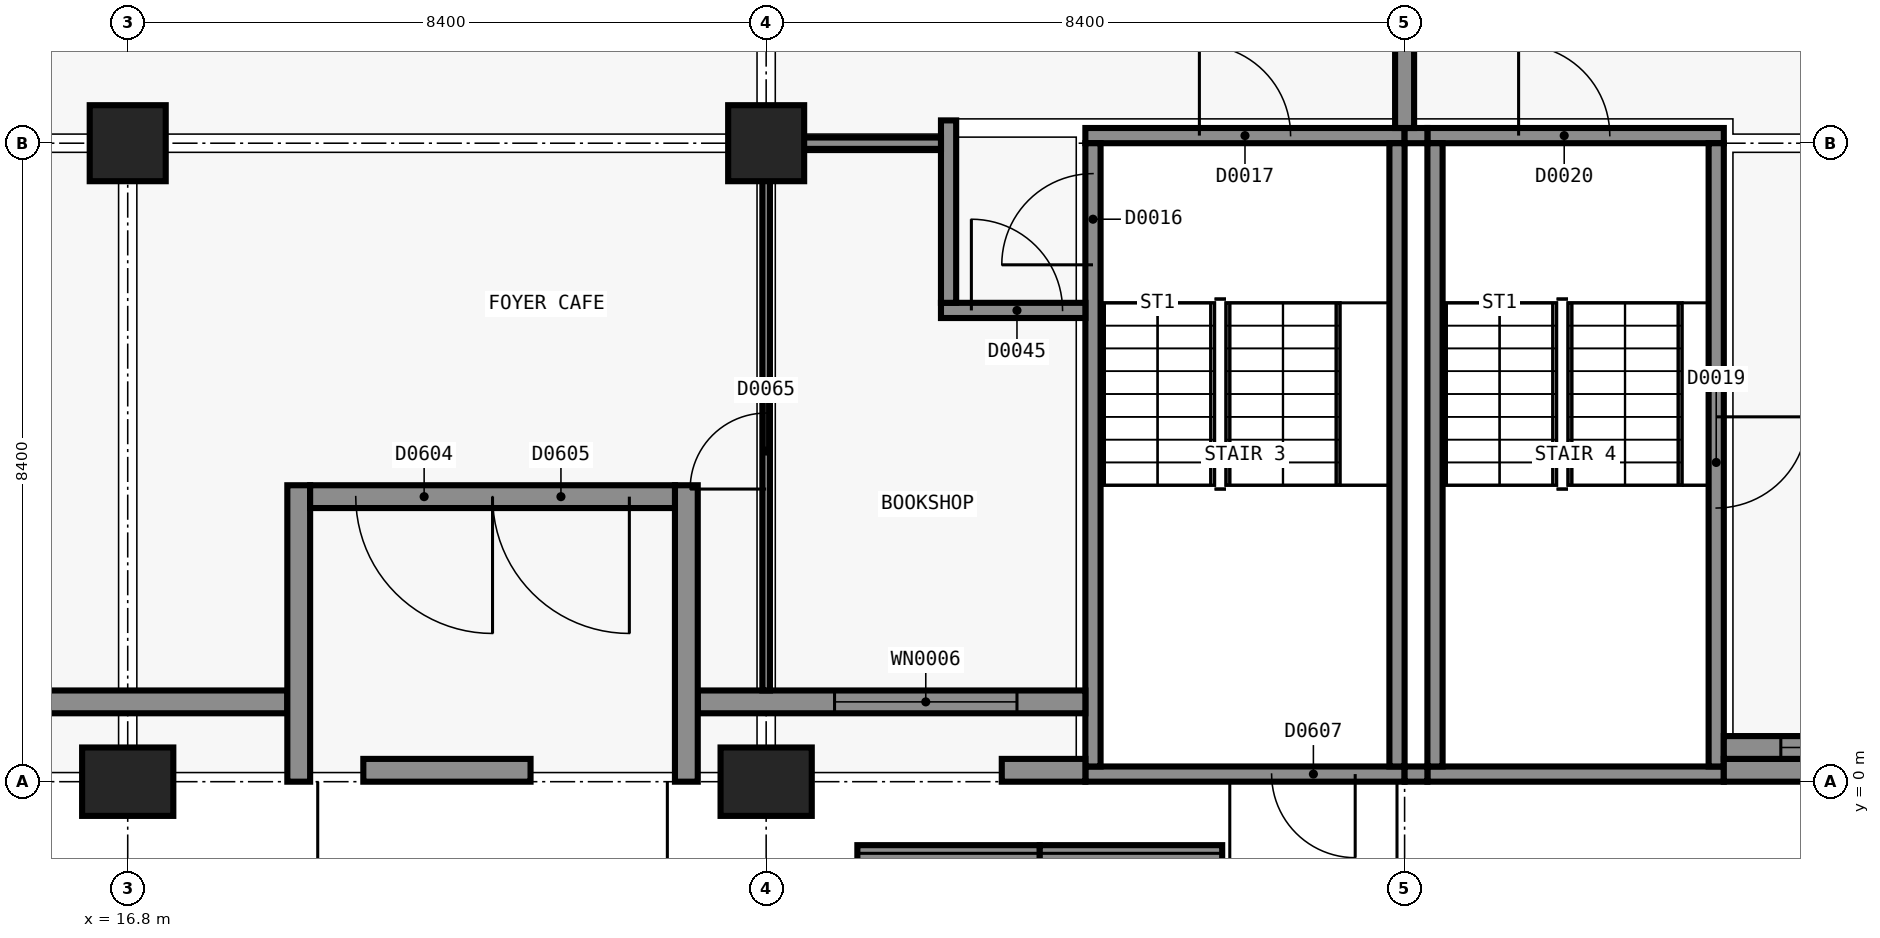
"""IFC4 building model, lengths in metres.
Left out: names, types, materials, properties, quantities, classifications, styles, units other than length and angle.
Written with IfcOpenShell. Run it as: python <this file> out.ifc"""

import sys

from ifc_helpers import new_model, si_unit, direction, frame, frame_2d, origin, origin_2d, place, context, subcontext, project, spatial, rectangle, extrude, element, fill, save


model = new_model("IFC4")
c1 = context("Model", 3, precision=1e-05, world=origin(), true_north=direction((0.0, 1.0)))
c2 = subcontext(c1, "Body", "Model", "MODEL_VIEW")
j1 = project(units=[si_unit("LENGTHUNIT", "METRE"), si_unit("PLANEANGLEUNIT", "RADIAN")], contexts=[c1])
p1 = place(None, origin())
s1 = spatial("IfcSite", under=j1, at=p1, CompositionType="ELEMENT")
p2 = place(p1, origin())
s2 = spatial("IfcBuilding", under=s1, at=p2, CompositionType="ELEMENT")
p3 = place(p2, origin())
s3 = spatial("IfcBuildingStorey", under=s2, at=p3, CompositionType="ELEMENT", Elevation=0.0)
p4 = place(p3, frame((33.6, 0.1, -0.3), z_axis=(0.0, 0.0, 1.0), x_axis=(-1.0, 0.0, 0.0)))
e1 = element("IfcWall", 1, at=p4, inside=s3, PredefinedType="SHEAR", context=c2, shape_type="SweptSolid", body=[
    extrude(rectangle(XDim=4.2, YDim=0.2, at=frame_2d((2.1, 0.0))), origin(), (0.0, 0.0, 1.0), 5.7),
])
p5 = place(p4, frame((0.65, 0.0, 0.0)))
e2 = element("IfcOpeningElement", 2, at=p5, cuts=e1, PredefinedType="OPENING", context=c2, shape_type="SweptSolid", body=[
    extrude(rectangle(XDim=1.1, YDim=2.2, at=frame_2d((0.55, 1.1))), frame((0.0, 0.11, 0.0), z_axis=(0.0, -1.0, 0.0), x_axis=(1.0, 0.0, 0.0)), (0.0, 0.0, 1.0), 0.22),
])
p6 = place(p3, frame((29.4, 8.5, -0.3), z_axis=(0.0, 0.0, 1.0), x_axis=(1.0, 0.0, 0.0)))
e3 = element("IfcWall", 3, at=p6, inside=s3, PredefinedType="SHEAR", context=c2, shape_type="SweptSolid", body=[
    extrude(rectangle(XDim=4.2, YDim=0.2, at=frame_2d((2.1, 0.0))), origin(), (0.0, 0.0, 1.0), 5.7),
])
p7 = place(p6, frame((1.5, 0.0, 0.3)))
e4 = element("IfcOpeningElement", 4, at=p7, cuts=e3, PredefinedType="OPENING", context=c2, shape_type="SweptSolid", body=[
    extrude(rectangle(XDim=1.2, YDim=2.1, at=frame_2d((0.6, 1.05))), frame((0.0, 0.11, 0.0), z_axis=(0.0, -1.0, 0.0), x_axis=(1.0, 0.0, 0.0)), (0.0, 0.0, 1.0), 0.22),
])
p8 = place(p3, frame((29.5, 0.2, -0.3), z_axis=(0.0, 0.0, 1.0), x_axis=(0.0, 1.0, 0.0)))
e5 = element("IfcWall", 5, at=p8, inside=s3, PredefinedType="SHEAR", context=c2, shape_type="SweptSolid", body=[
    extrude(rectangle(XDim=8.2, YDim=0.2, at=frame_2d((4.1, 0.0))), origin(), (0.0, 0.0, 1.0), 5.7),
])
p9 = place(p8, frame((6.6, 0.0, 0.3)))
e6 = element("IfcOpeningElement", 6, at=p9, cuts=e5, PredefinedType="OPENING", context=c2, shape_type="SweptSolid", body=[
    extrude(rectangle(XDim=1.2, YDim=2.1, at=frame_2d((0.6, 1.05))), frame((0.0, 0.11, 0.0), z_axis=(0.0, -1.0, 0.0), x_axis=(1.0, 0.0, 0.0)), (0.0, 0.0, 1.0), 0.22),
])
p10 = place(p3, frame((33.5, 8.4, -0.3), z_axis=(0.0, 0.0, 1.0), x_axis=(0.0, -1.0, 0.0)))
e7 = element("IfcWall", 7, at=p10, inside=s3, PredefinedType="SHEAR", context=c2, shape_type="SweptSolid", body=[
    extrude(rectangle(XDim=8.2, YDim=0.2, at=frame_2d((4.1, 0.0))), origin(), (0.0, 0.0, 1.0), 5.7),
])
p11 = place(p3, frame((37.8, 0.1, -0.3), z_axis=(0.0, 0.0, 1.0), x_axis=(-1.0, 0.0, 0.0)))
e8 = element("IfcWall", 8, at=p11, inside=s3, PredefinedType="SHEAR", context=c2, shape_type="SweptSolid", body=[
    extrude(rectangle(XDim=3.9, YDim=0.2, at=frame_2d((1.95, 0.0))), origin(), (0.0, 0.0, 1.0), 5.7),
])
p12 = place(p3, frame((33.9, 8.5, -0.3), z_axis=(0.0, 0.0, 1.0), x_axis=(1.0, 0.0, 0.0)))
e9 = element("IfcWall", 9, at=p12, inside=s3, PredefinedType="SHEAR", context=c2, shape_type="SweptSolid", body=[
    extrude(rectangle(XDim=3.9, YDim=0.2, at=frame_2d((1.95, 0.0))), origin(), (0.0, 0.0, 1.0), 5.7),
])
p13 = place(p12, frame((1.2, 0.0, 0.3)))
e10 = element("IfcOpeningElement", 10, at=p13, cuts=e9, PredefinedType="OPENING", context=c2, shape_type="SweptSolid", body=[
    extrude(rectangle(XDim=1.2, YDim=2.1, at=frame_2d((0.6, 1.05))), frame((0.0, 0.11, 0.0), z_axis=(0.0, -1.0, 0.0), x_axis=(1.0, 0.0, 0.0)), (0.0, 0.0, 1.0), 0.22),
])
p14 = place(p3, frame((34.0, 0.2, -0.3), z_axis=(0.0, 0.0, 1.0), x_axis=(0.0, 1.0, 0.0)))
e11 = element("IfcWall", 11, at=p14, inside=s3, PredefinedType="SHEAR", context=c2, shape_type="SweptSolid", body=[
    extrude(rectangle(XDim=8.2, YDim=0.2, at=frame_2d((4.1, 0.0))), origin(), (0.0, 0.0, 1.0), 5.7),
])
p15 = place(p3, frame((37.7, 8.4, -0.3), z_axis=(0.0, 0.0, 1.0), x_axis=(0.0, -1.0, 0.0)))
e12 = element("IfcWall", 12, at=p15, inside=s3, PredefinedType="SHEAR", context=c2, shape_type="SweptSolid", body=[
    extrude(rectangle(XDim=8.2, YDim=0.2, at=frame_2d((4.1, 0.0))), origin(), (0.0, 0.0, 1.0), 5.7),
])
p16 = place(p15, frame((3.6, 0.0, 0.3)))
e13 = element("IfcOpeningElement", 13, at=p16, cuts=e12, PredefinedType="OPENING", context=c2, shape_type="SweptSolid", body=[
    extrude(rectangle(XDim=1.2, YDim=2.1, at=frame_2d((0.6, 1.05))), frame((0.0, 0.11, 0.0), z_axis=(0.0, -1.0, 0.0), x_axis=(1.0, 0.0, 0.0)), (0.0, 0.0, 1.0), 0.22),
])
p17 = place(p3, frame((16.8, 0.0, -0.3), z_axis=(0.0, 0.0, 1.0), x_axis=(1.0, 0.0, 0.0)))
e14 = element("IfcColumn", 14, at=p17, inside=s3, PredefinedType="COLUMN", context=c2, shape_type="SweptSolid", body=[
    extrude(rectangle(XDim=1.2, YDim=0.9, at=origin_2d()), origin(), (0.0, 0.0, 1.0), 5.7),
])
p18 = place(p3, frame((16.8, 8.4, -0.3), z_axis=(0.0, 0.0, 1.0), x_axis=(1.0, 0.0, 0.0)))
e15 = element("IfcColumn", 15, at=p18, inside=s3, PredefinedType="COLUMN", context=c2, shape_type="SweptSolid", body=[
    extrude(rectangle(XDim=1.0, YDim=1.0, at=origin_2d()), origin(), (0.0, 0.0, 1.0), 5.7),
])
p19 = place(p3, frame((25.2, 0.0, -0.3), z_axis=(0.0, 0.0, 1.0), x_axis=(1.0, 0.0, 0.0)))
e16 = element("IfcColumn", 16, at=p19, inside=s3, PredefinedType="COLUMN", context=c2, shape_type="SweptSolid", body=[
    extrude(rectangle(XDim=1.2, YDim=0.9, at=origin_2d()), origin(), (0.0, 0.0, 1.0), 5.7),
])
p20 = place(p3, frame((25.2, 8.4, -0.3), z_axis=(0.0, 0.0, 1.0), x_axis=(1.0, 0.0, 0.0)))
e17 = element("IfcColumn", 17, at=p20, inside=s3, PredefinedType="COLUMN", context=c2, shape_type="SweptSolid", body=[
    extrude(rectangle(XDim=1.0, YDim=1.0, at=origin_2d()), origin(), (0.0, 0.0, 1.0), 5.7),
])
for number, where, z_axis, x_axis in (
    (18, (33.9, 0.1, -0.3), (0.0, 0.0, 1.0), (-1.0, 0.0, 0.0)),
    (19, (33.6, 8.5, -0.3), (0.0, 0.0, 1.0), (1.0, 0.0, 0.0)),
):
    element("IfcWall", number, at=place(p3, frame(where, z_axis=z_axis, x_axis=x_axis)), inside=s3, PredefinedType="SHEAR", context=c2, shape_type="SweptSolid", body=[
        extrude(rectangle(XDim=0.3, YDim=0.2, at=frame_2d((0.15, 0.0))), origin(), (0.0, 0.0, 1.0), 5.7),
    ])
p21 = place(p3, frame((22.1, 0.15, -1.2), z_axis=(0.0, 0.0, 1.0), x_axis=(-1.0, 0.0, 0.0)))
e20 = element("IfcWall", 20, at=p21, inside=s3, PredefinedType="SOLIDWALL", context=c2, shape_type="SweptSolid", body=[
    extrude(rectangle(XDim=2.2, YDim=0.3, at=frame_2d((1.1, 0.0))), origin(), (0.0, 0.0, 1.0), 0.9),
])
for number, where, z_axis, x_axis in (
    (21, (29.4, 0.15, -1.2), (0.0, 0.0, 1.0), (-1.0, 0.0, 0.0)),
    (22, (38.9, 0.15, -1.2), (0.0, 0.0, 1.0), (-1.0, 0.0, 0.0)),
):
    element("IfcWall", number, at=place(p3, frame(where, z_axis=z_axis, x_axis=x_axis)), inside=s3, PredefinedType="SOLIDWALL", context=c2, shape_type="SweptSolid", body=[
        extrude(rectangle(XDim=1.1, YDim=0.3, at=frame_2d((0.55, 0.0))), origin(), (0.0, 0.0, 1.0), 0.9),
    ])
p22 = place(p3, frame((58.8, 0.45, 0.0), z_axis=(0.0, 0.0, 1.0), x_axis=(-1.0, 0.0, 0.0)))
e23 = element("IfcWall", 23, at=p22, inside=s3, PredefinedType="SOLIDWALL", context=c2, shape_type="SweptSolid", body=[
    extrude(rectangle(XDim=21.0, YDim=0.3, at=frame_2d((10.5, 0.0))), origin(), (0.0, 0.0, 1.0), 5.1),
])
p23 = place(p22, frame((17.85, 0.0, 0.9)))
e24 = element("IfcOpeningElement", 24, at=p23, cuts=e23, PredefinedType="OPENING", context=c2, shape_type="SweptSolid", body=[
    extrude(rectangle(XDim=2.4, YDim=1.5, at=frame_2d((1.2, 0.75))), frame((0.0, 0.16, 0.0), z_axis=(0.0, -1.0, 0.0), x_axis=(1.0, 0.0, 0.0)), (0.0, 0.0, 1.0), 0.32),
])
p24 = place(p22, frame((3.0, 0.0, 0.9)))
e25 = element("IfcOpeningElement", 25, at=p24, cuts=e23, PredefinedType="OPENING", context=c2, shape_type="SweptSolid", body=[
    extrude(rectangle(XDim=2.4, YDim=1.5, at=frame_2d((1.2, 0.75))), frame((0.0, 0.16, 0.0), z_axis=(0.0, -1.0, 0.0), x_axis=(1.0, 0.0, 0.0)), (0.0, 0.0, 1.0), 0.32),
])
p25 = place(p22, frame((12.6, 0.0, 0.0)))
e26 = element("IfcOpeningElement", 26, at=p25, cuts=e23, PredefinedType="OPENING", context=c2, shape_type="SweptSolid", body=[
    extrude(rectangle(XDim=3.0, YDim=2.8, at=frame_2d((1.5, 1.4))), frame((0.0, 0.16, 0.0), z_axis=(0.0, -1.0, 0.0), x_axis=(1.0, 0.0, 0.0)), (0.0, 0.0, 1.0), 0.32),
])
p26 = place(p22, frame((9.6, 0.0, 0.0)))
e27 = element("IfcOpeningElement", 27, at=p26, cuts=e23, PredefinedType="OPENING", context=c2, shape_type="SweptSolid", body=[
    extrude(rectangle(XDim=3.0, YDim=2.8, at=frame_2d((1.5, 1.4))), frame((0.0, 0.16, 0.0), z_axis=(0.0, -1.0, 0.0), x_axis=(1.0, 0.0, 0.0)), (0.0, 0.0, 1.0), 0.32),
])
p27 = place(p3, frame((26.4, -0.942, -1.2), z_axis=(0.0, 0.0, 1.0), x_axis=(1.0, 0.0, 0.0)))
e28 = element("IfcWall", 28, at=p27, inside=s3, PredefinedType="SOLIDWALL", context=c2, shape_type="SweptSolid", body=[
    extrude(rectangle(XDim=2.4, YDim=0.215, at=frame_2d((1.2, 0.0))), origin(), (0.0, 0.0, 1.0), 1.2),
])
p28 = place(p3, frame((28.8, -0.942, -1.2), z_axis=(0.0, 0.0, 1.0), x_axis=(1.0, 0.0, 0.0)))
e29 = element("IfcWall", 29, at=p28, inside=s3, PredefinedType="SOLIDWALL", context=c2, shape_type="SweptSolid", body=[
    extrude(rectangle(XDim=2.4, YDim=0.215, at=frame_2d((1.2, 0.0))), origin(), (0.0, 0.0, 1.0), 1.2),
])
p29 = place(p3, frame((18.9, 1.05, 0.0), z_axis=(0.0, 0.0, 1.0), x_axis=(-1.0, 0.0, 0.0)))
e30 = element("IfcWall", 30, at=p29, inside=s3, PredefinedType="SOLIDWALL", context=c2, shape_type="SweptSolid", body=[
    extrude(rectangle(XDim=4.2, YDim=0.3, at=frame_2d((2.1, 0.0))), origin(), (0.0, 0.0, 1.0), 5.1),
])
p30 = place(p3, frame((29.4, 1.05, 0.0), z_axis=(0.0, 0.0, 1.0), x_axis=(-1.0, 0.0, 0.0)))
e31 = element("IfcWall", 31, at=p30, inside=s3, PredefinedType="SOLIDWALL", context=c2, shape_type="SweptSolid", body=[
    extrude(rectangle(XDim=5.1, YDim=0.3, at=frame_2d((2.55, 0.0))), origin(), (0.0, 0.0, 1.0), 5.1),
])
p31 = place(p30, frame((0.9, 0.0, 0.45)))
e32 = element("IfcOpeningElement", 32, at=p31, cuts=e31, PredefinedType="OPENING", context=c2, shape_type="SweptSolid", body=[
    extrude(rectangle(XDim=2.4, YDim=3.0, at=frame_2d((1.2, 1.5))), frame((0.0, 0.16, 0.0), z_axis=(0.0, -1.0, 0.0), x_axis=(1.0, 0.0, 0.0)), (0.0, 0.0, 1.0), 0.32),
])
for number, where, z_axis, x_axis in (
    (33, (19.05, 3.9, 0.0), (0.0, 0.0, 1.0), (0.0, -1.0, 0.0)),
    (34, (24.15, 3.9, 0.0), (0.0, 0.0, 1.0), (0.0, -1.0, 0.0)),
):
    element("IfcWall", number, at=place(p3, frame(where, z_axis=z_axis, x_axis=x_axis)), inside=s3, PredefinedType="SOLIDWALL", context=c2, shape_type="SweptSolid", body=[
        extrude(rectangle(XDim=3.9, YDim=0.3, at=frame_2d((1.95, 0.0))), origin(), (0.0, 0.0, 1.0), 5.1),
    ])
p32 = place(p3, frame((24.0, 3.75, 0.0), z_axis=(0.0, 0.0, 1.0), x_axis=(-1.0, 0.0, 0.0)))
e35 = element("IfcWall", 35, at=p32, inside=s3, PredefinedType="SOLIDWALL", context=c2, shape_type="SweptSolid", body=[
    extrude(rectangle(XDim=4.8, YDim=0.3, at=frame_2d((2.4, 0.0))), origin(), (0.0, 0.0, 1.0), 5.1),
])
p33 = place(p32, frame((2.4, 0.0, 0.0)))
e36 = element("IfcOpeningElement", 36, at=p33, cuts=e35, PredefinedType="OPENING", context=c2, shape_type="SweptSolid", body=[
    extrude(rectangle(XDim=1.8, YDim=2.4, at=frame_2d((0.9, 1.2))), frame((0.0, 0.16, 0.0), z_axis=(0.0, -1.0, 0.0), x_axis=(1.0, 0.0, 0.0)), (0.0, 0.0, 1.0), 0.32),
])
p34 = place(p32, frame((0.6, 0.0, 0.0)))
e37 = element("IfcOpeningElement", 37, at=p34, cuts=e35, PredefinedType="OPENING", context=c2, shape_type="SweptSolid", body=[
    extrude(rectangle(XDim=1.8, YDim=2.4, at=frame_2d((0.9, 1.2))), frame((0.0, 0.16, 0.0), z_axis=(0.0, -1.0, 0.0), x_axis=(1.0, 0.0, 0.0)), (0.0, 0.0, 1.0), 0.32),
])
p35 = place(p3, frame((33.6, 8.6, 0.0), z_axis=(0.0, 0.0, 1.0), x_axis=(0.0, 1.0, 0.0)))
e38 = element("IfcWall", 38, at=p35, inside=s3, PredefinedType="SOLIDWALL", context=c2, shape_type="SweptSolid", body=[
    extrude(rectangle(XDim=15.85, YDim=0.25, at=frame_2d((7.925, 0.0))), origin(), (0.0, 0.0, 1.0), 4.4),
])
p36 = place(p3, frame((27.5, 6.2, 0.0), z_axis=(0.0, 0.0, 1.0), x_axis=(1.0, 0.0, 0.0)))
e39 = element("IfcWall", 39, at=p36, inside=s3, PredefinedType="SOLIDWALL", context=c2, shape_type="SweptSolid", body=[
    extrude(rectangle(XDim=1.9, YDim=0.2, at=frame_2d((0.95, 0.0))), origin(), (0.0, 0.0, 1.0), 5.1),
])
p37 = place(p36, frame((0.4, 0.0, 0.0)))
e40 = element("IfcOpeningElement", 40, at=p37, cuts=e39, PredefinedType="OPENING", context=c2, shape_type="SweptSolid", body=[
    extrude(rectangle(XDim=1.2, YDim=2.1, at=frame_2d((0.6, 1.05))), frame((0.0, 0.11, 0.0), z_axis=(0.0, -1.0, 0.0), x_axis=(1.0, 0.0, 0.0)), (0.0, 0.0, 1.0), 0.22),
])
p38 = place(p3, frame((27.6, 6.3, 0.0), z_axis=(0.0, 0.0, 1.0), x_axis=(0.0, 1.0, 0.0)))
e41 = element("IfcWall", 41, at=p38, inside=s3, PredefinedType="SOLIDWALL", context=c2, shape_type="SweptSolid", body=[
    extrude(rectangle(XDim=2.4, YDim=0.2, at=frame_2d((1.2, 0.0))), origin(), (0.0, 0.0, 1.0), 4.6),
])
p39 = place(p3, frame((25.125, 8.4, 0.0), z_axis=(0.0, 0.0, 1.0), x_axis=(1.0, 0.0, 0.0)))
e42 = element("IfcWall", 42, at=p39, inside=s3, PredefinedType="PARTITIONING", context=c2, shape_type="SweptSolid", body=[
    extrude(rectangle(XDim=2.375, YDim=0.15, at=frame_2d((1.188, 0.0))), origin(), (0.0, 0.0, 1.0), 4.4),
])
p40 = place(p3, frame((25.2, 1.2, 0.0), z_axis=(0.0, 0.0, 1.0), x_axis=(0.0, 1.0, 0.0)))
e43 = element("IfcWall", 43, at=p40, inside=s3, PredefinedType="PARTITIONING", context=c2, shape_type="SweptSolid", body=[
    extrude(rectangle(XDim=7.125, YDim=0.1, at=frame_2d((3.562, 0.0))), origin(), (0.0, 0.0, 1.0), 4.4),
])
p41 = place(p40, frame((2.65, 0.0, 0.0)))
e44 = element("IfcOpeningElement", 44, at=p41, cuts=e43, PredefinedType="OPENING", context=c2, shape_type="SweptSolid", body=[
    extrude(rectangle(XDim=1.0, YDim=2.1, at=frame_2d((0.5, 1.05))), frame((0.0, 0.06, 0.0), z_axis=(0.0, -1.0, 0.0), x_axis=(1.0, 0.0, 0.0)), (0.0, 0.0, 1.0), 0.12),
])
p42 = place(p23, origin())
e45 = element("IfcWindow", 45, at=p42, inside=s3, PartitioningType="SINGLE_PANEL", PredefinedType="WINDOW", context=c2, shape_type="SweptSolid", body=[
    extrude(rectangle(XDim=2.4, YDim=1.5, at=frame_2d((1.2, 0.75))), frame((0.0, 0.03, 0.0), z_axis=(0.0, -1.0, 0.0), x_axis=(1.0, 0.0, 0.0)), (0.0, 0.0, 1.0), 0.06),
])
fill(e24, e45)
p43 = place(p31, origin())
e46 = element("IfcWindow", 46, at=p43, inside=s3, PartitioningType="SINGLE_PANEL", PredefinedType="WINDOW", context=c2, shape_type="SweptSolid", body=[
    extrude(rectangle(XDim=2.4, YDim=3.0, at=frame_2d((1.2, 1.5))), frame((0.0, 0.03, 0.0), z_axis=(0.0, -1.0, 0.0), x_axis=(1.0, 0.0, 0.0)), (0.0, 0.0, 1.0), 0.06),
])
fill(e32, e46)
p44 = place(p33, origin())
e47 = element("IfcDoor", 47, at=p44, inside=s3, OperationType="SINGLE_SWING_LEFT", PredefinedType="DOOR", context=c2, shape_type="SweptSolid", body=[
    extrude(rectangle(XDim=1.8, YDim=2.4, at=frame_2d((0.9, 1.2))), frame((0.0, 0.025, 0.0), z_axis=(0.0, -1.0, 0.0), x_axis=(1.0, 0.0, 0.0)), (0.0, 0.0, 1.0), 0.05),
])
fill(e36, e47)
p45 = place(p34, origin())
e48 = element("IfcDoor", 48, at=p45, inside=s3, OperationType="SINGLE_SWING_LEFT", PredefinedType="DOOR", context=c2, shape_type="SweptSolid", body=[
    extrude(rectangle(XDim=1.8, YDim=2.4, at=frame_2d((0.9, 1.2))), frame((0.0, 0.025, 0.0), z_axis=(0.0, -1.0, 0.0), x_axis=(1.0, 0.0, 0.0)), (0.0, 0.0, 1.0), 0.05),
])
fill(e37, e48)
p46 = place(p5, origin())
e49 = element("IfcDoor", 49, at=p46, inside=s3, OperationType="SINGLE_SWING_LEFT", PredefinedType="DOOR", context=c2, shape_type="SweptSolid", body=[
    extrude(rectangle(XDim=1.1, YDim=2.2, at=frame_2d((0.55, 1.1))), frame((0.0, 0.025, 0.0), z_axis=(0.0, -1.0, 0.0), x_axis=(1.0, 0.0, 0.0)), (0.0, 0.0, 1.0), 0.05),
])
fill(e2, e49)
p47 = place(p9, origin())
e50 = element("IfcDoor", 50, at=p47, inside=s3, OperationType="SINGLE_SWING_RIGHT", PredefinedType="DOOR", context=c2, shape_type="SweptSolid", body=[
    extrude(rectangle(XDim=1.2, YDim=2.1, at=frame_2d((0.6, 1.05))), frame((0.0, 0.025, 0.0), z_axis=(0.0, -1.0, 0.0), x_axis=(1.0, 0.0, 0.0)), (0.0, 0.0, 1.0), 0.05),
])
fill(e6, e50)
p48 = place(p7, origin())
e51 = element("IfcDoor", 51, at=p48, inside=s3, OperationType="SINGLE_SWING_RIGHT", PredefinedType="DOOR", context=c2, shape_type="SweptSolid", body=[
    extrude(rectangle(XDim=1.2, YDim=2.1, at=frame_2d((0.6, 1.05))), frame((0.0, 0.025, 0.0), z_axis=(0.0, -1.0, 0.0), x_axis=(1.0, 0.0, 0.0)), (0.0, 0.0, 1.0), 0.05),
])
fill(e4, e51)
p49 = place(p16, origin())
e52 = element("IfcDoor", 52, at=p49, inside=s3, OperationType="SINGLE_SWING_RIGHT", PredefinedType="DOOR", context=c2, shape_type="SweptSolid", body=[
    extrude(rectangle(XDim=1.2, YDim=2.1, at=frame_2d((0.6, 1.05))), frame((0.0, 0.025, 0.0), z_axis=(0.0, -1.0, 0.0), x_axis=(1.0, 0.0, 0.0)), (0.0, 0.0, 1.0), 0.05),
])
fill(e13, e52)
p50 = place(p13, origin())
e53 = element("IfcDoor", 53, at=p50, inside=s3, OperationType="SINGLE_SWING_RIGHT", PredefinedType="DOOR", context=c2, shape_type="SweptSolid", body=[
    extrude(rectangle(XDim=1.2, YDim=2.1, at=frame_2d((0.6, 1.05))), frame((0.0, 0.025, 0.0), z_axis=(0.0, -1.0, 0.0), x_axis=(1.0, 0.0, 0.0)), (0.0, 0.0, 1.0), 0.05),
])
fill(e10, e53)
p51 = place(p37, origin())
e54 = element("IfcDoor", 54, at=p51, inside=s3, OperationType="SINGLE_SWING_RIGHT", PredefinedType="DOOR", context=c2, shape_type="SweptSolid", body=[
    extrude(rectangle(XDim=1.2, YDim=2.1, at=frame_2d((0.6, 1.05))), frame((0.0, 0.025, 0.0), z_axis=(0.0, -1.0, 0.0), x_axis=(1.0, 0.0, 0.0)), (0.0, 0.0, 1.0), 0.05),
])
fill(e40, e54)
p52 = place(p41, origin())
e55 = element("IfcDoor", 55, at=p52, inside=s3, OperationType="SINGLE_SWING_RIGHT", PredefinedType="DOOR", context=c2, shape_type="SweptSolid", body=[
    extrude(rectangle(XDim=1.0, YDim=2.1, at=frame_2d((0.5, 1.05))), frame((0.0, 0.025, 0.0), z_axis=(0.0, -1.0, 0.0), x_axis=(1.0, 0.0, 0.0)), (0.0, 0.0, 1.0), 0.05),
])
fill(e44, e55)
save(model, sys.argv[1])
